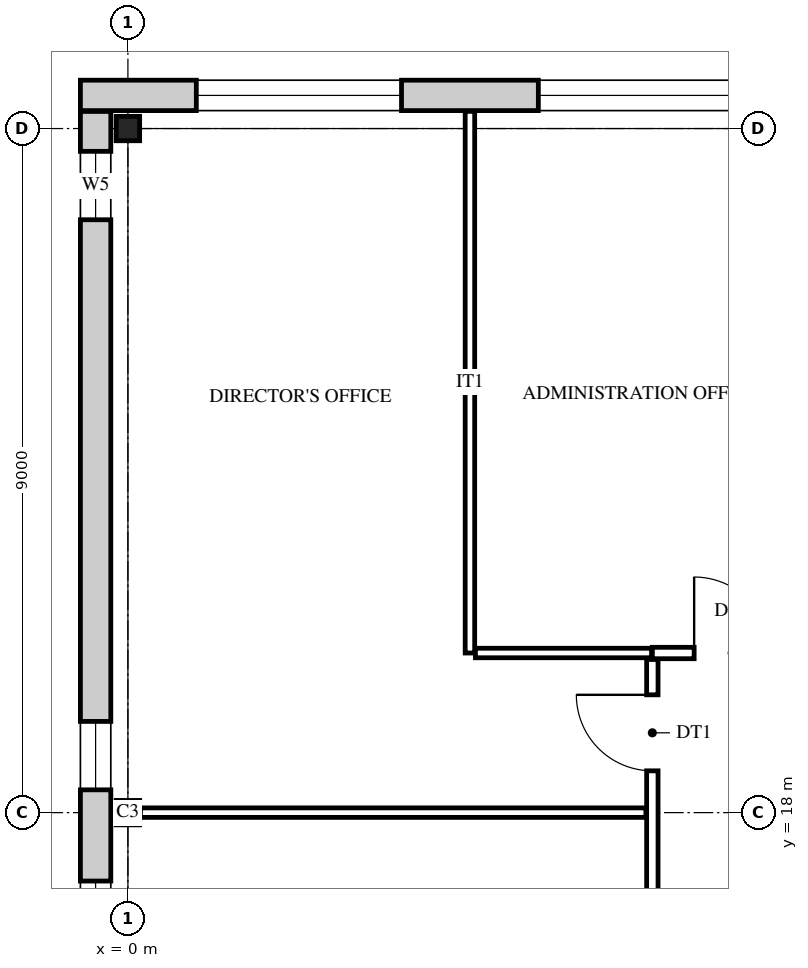
"""IFC4 building model, lengths in metres.
Left out: names, types, materials, properties, quantities, classifications, styles, units other than length and angle.
Written with IfcOpenShell. Run it as: python <this file> out.ifc"""

import sys

from ifc_helpers import new_model, si_unit, direction, frame, frame_2d, origin, origin_2d, place, context, subcontext, project, spatial, rectangle, i_section, extrude, element, fill, save


model = new_model("IFC4")
c1 = context("Model", 3, precision=1e-05, world=origin(), true_north=direction((0.0, 1.0)))
c2 = subcontext(c1, "Body", "Model", "MODEL_VIEW")
j1 = project(units=[si_unit("LENGTHUNIT", "METRE"), si_unit("PLANEANGLEUNIT", "RADIAN")], contexts=[c1])
p1 = place(None, origin())
s1 = spatial("IfcSite", under=j1, at=p1, CompositionType="ELEMENT")
p2 = place(p1, origin())
s2 = spatial("IfcBuilding", under=s1, at=p2, CompositionType="ELEMENT")
p3 = place(p2, frame((0.0, 0.0, 57.0)))
s3 = spatial("IfcBuildingStorey", under=s2, at=p3, CompositionType="ELEMENT", Elevation=57.0)
for number, where, z_axis, x_axis in (
    (1, (0.0, 18.0, 0.0), (0.0, 0.0, 1.0), (1.0, 0.0, 0.0)),
    (2, (0.0, 27.0, 0.0), (0.0, 0.0, 1.0), (1.0, 0.0, 0.0)),
):
    element("IfcColumn", number, at=place(p3, frame(where, z_axis=z_axis, x_axis=x_axis)), inside=s3, PredefinedType="COLUMN", context=c2, shape_type="SweptSolid", body=[
        extrude(i_section(OverallWidth=0.309, OverallDepth=0.321, WebThickness=0.014, FlangeThickness=0.022, FilletRadius=0.017, at=origin_2d()), origin(), (0.0, 0.0, 1.0), 4.2),
    ])
p4 = place(p3, frame((-0.425, -0.225, 0.0), z_axis=(0.0, 0.0, 1.0), x_axis=(0.0, 1.0, 0.0)))
e3 = element("IfcWall", 3, at=p4, inside=s3, PredefinedType="STANDARD", context=c2, shape_type="SweptSolid", body=[
    extrude(rectangle(XDim=27.45, YDim=0.4, at=frame_2d((13.725, 0.0))), origin(), (0.0, 0.0, 1.0), 4.2),
])
p5 = place(p4, frame((0.525, 0.0, 0.9)))
e4 = element("IfcOpeningElement", 4, at=p5, cuts=e3, PredefinedType="OPENING", context=c2, shape_type="SweptSolid", body=[
    extrude(rectangle(XDim=0.9, YDim=2.0, at=frame_2d((0.45, 1.0))), frame((0.0, 0.21, 0.0), z_axis=(0.0, -1.0, 0.0), x_axis=(1.0, 0.0, 0.0)), (0.0, 0.0, 1.0), 0.42),
])
p6 = place(p4, frame((8.025, 0.0, 0.9)))
e5 = element("IfcOpeningElement", 5, at=p6, cuts=e3, PredefinedType="OPENING", context=c2, shape_type="SweptSolid", body=[
    extrude(rectangle(XDim=0.9, YDim=2.0, at=frame_2d((0.45, 1.0))), frame((0.0, 0.21, 0.0), z_axis=(0.0, -1.0, 0.0), x_axis=(1.0, 0.0, 0.0)), (0.0, 0.0, 1.0), 0.42),
])
p7 = place(p4, frame((10.125, 0.0, 0.9)))
e6 = element("IfcOpeningElement", 6, at=p7, cuts=e3, PredefinedType="OPENING", context=c2, shape_type="SweptSolid", body=[
    extrude(rectangle(XDim=2.7, YDim=2.5, at=frame_2d((1.35, 1.25))), frame((0.0, 0.21, 0.0), z_axis=(0.0, -1.0, 0.0), x_axis=(1.0, 0.0, 0.0)), (0.0, 0.0, 1.0), 0.42),
])
p8 = place(p4, frame((14.625, 0.0, 0.9)))
e7 = element("IfcOpeningElement", 7, at=p8, cuts=e3, PredefinedType="OPENING", context=c2, shape_type="SweptSolid", body=[
    extrude(rectangle(XDim=2.7, YDim=2.5, at=frame_2d((1.35, 1.25))), frame((0.0, 0.21, 0.0), z_axis=(0.0, -1.0, 0.0), x_axis=(1.0, 0.0, 0.0)), (0.0, 0.0, 1.0), 0.42),
])
p9 = place(p4, frame((18.525, 0.0, 0.9)))
e8 = element("IfcOpeningElement", 8, at=p9, cuts=e3, PredefinedType="OPENING", context=c2, shape_type="SweptSolid", body=[
    extrude(rectangle(XDim=0.9, YDim=2.0, at=frame_2d((0.45, 1.0))), frame((0.0, 0.21, 0.0), z_axis=(0.0, -1.0, 0.0), x_axis=(1.0, 0.0, 0.0)), (0.0, 0.0, 1.0), 0.42),
])
p10 = place(p4, frame((26.025, 0.0, 0.9)))
e9 = element("IfcOpeningElement", 9, at=p10, cuts=e3, PredefinedType="OPENING", context=c2, shape_type="SweptSolid", body=[
    extrude(rectangle(XDim=0.9, YDim=2.0, at=frame_2d((0.45, 1.0))), frame((0.0, 0.21, 0.0), z_axis=(0.0, -1.0, 0.0), x_axis=(1.0, 0.0, 0.0)), (0.0, 0.0, 1.0), 0.42),
])
p11 = place(p3, frame((-0.625, 27.436, 0.0), z_axis=(0.0, 0.0, 1.0), x_axis=(1.0, 0.0, 0.0)))
e10 = element("IfcWall", 10, at=p11, inside=s3, PredefinedType="STANDARD", context=c2, shape_type="SweptSolid", body=[
    extrude(rectangle(XDim=32.75, YDim=0.4, at=frame_2d((16.375, 0.0))), origin(), (0.0, 0.0, 1.0), 4.2),
])
p12 = place(p11, frame((1.525, 0.0, 0.9)))
e11 = element("IfcOpeningElement", 11, at=p12, cuts=e10, PredefinedType="OPENING", context=c2, shape_type="SweptSolid", body=[
    extrude(rectangle(XDim=2.7, YDim=2.5, at=frame_2d((1.35, 1.25))), frame((0.0, 0.21, 0.0), z_axis=(0.0, -1.0, 0.0), x_axis=(1.0, 0.0, 0.0)), (0.0, 0.0, 1.0), 0.42),
])
p13 = place(p11, frame((6.025, 0.0, 0.9)))
e12 = element("IfcOpeningElement", 12, at=p13, cuts=e10, PredefinedType="OPENING", context=c2, shape_type="SweptSolid", body=[
    extrude(rectangle(XDim=2.7, YDim=2.5, at=frame_2d((1.35, 1.25))), frame((0.0, 0.21, 0.0), z_axis=(0.0, -1.0, 0.0), x_axis=(1.0, 0.0, 0.0)), (0.0, 0.0, 1.0), 0.42),
])
p14 = place(p11, frame((10.525, 0.0, 0.9)))
e13 = element("IfcOpeningElement", 13, at=p14, cuts=e10, PredefinedType="OPENING", context=c2, shape_type="SweptSolid", body=[
    extrude(rectangle(XDim=2.7, YDim=2.5, at=frame_2d((1.35, 1.25))), frame((0.0, 0.21, 0.0), z_axis=(0.0, -1.0, 0.0), x_axis=(1.0, 0.0, 0.0)), (0.0, 0.0, 1.0), 0.42),
])
p15 = place(p11, frame((15.025, 0.0, 0.9)))
e14 = element("IfcOpeningElement", 14, at=p15, cuts=e10, PredefinedType="OPENING", context=c2, shape_type="SweptSolid", body=[
    extrude(rectangle(XDim=2.7, YDim=2.5, at=frame_2d((1.35, 1.25))), frame((0.0, 0.21, 0.0), z_axis=(0.0, -1.0, 0.0), x_axis=(1.0, 0.0, 0.0)), (0.0, 0.0, 1.0), 0.42),
])
p16 = place(p11, frame((19.525, 0.0, 0.9)))
e15 = element("IfcOpeningElement", 15, at=p16, cuts=e10, PredefinedType="OPENING", context=c2, shape_type="SweptSolid", body=[
    extrude(rectangle(XDim=2.7, YDim=2.5, at=frame_2d((1.35, 1.25))), frame((0.0, 0.21, 0.0), z_axis=(0.0, -1.0, 0.0), x_axis=(1.0, 0.0, 0.0)), (0.0, 0.0, 1.0), 0.42),
])
p17 = place(p11, frame((24.025, 0.0, 0.9)))
e16 = element("IfcOpeningElement", 16, at=p17, cuts=e10, PredefinedType="OPENING", context=c2, shape_type="SweptSolid", body=[
    extrude(rectangle(XDim=2.7, YDim=2.5, at=frame_2d((1.35, 1.25))), frame((0.0, 0.21, 0.0), z_axis=(0.0, -1.0, 0.0), x_axis=(1.0, 0.0, 0.0)), (0.0, 0.0, 1.0), 0.42),
])
p18 = place(p11, frame((28.525, 0.0, 0.9)))
e17 = element("IfcOpeningElement", 17, at=p18, cuts=e10, PredefinedType="OPENING", context=c2, shape_type="SweptSolid", body=[
    extrude(rectangle(XDim=2.7, YDim=2.5, at=frame_2d((1.35, 1.25))), frame((0.0, 0.21, 0.0), z_axis=(0.0, -1.0, 0.0), x_axis=(1.0, 0.0, 0.0)), (0.0, 0.0, 1.0), 0.42),
])
p19 = place(p3, frame((4.5, 20.1, 0.0), z_axis=(0.0, 0.0, 1.0), x_axis=(0.0, 1.0, 0.0)))
e18 = element("IfcWall", 18, at=p19, inside=s3, PredefinedType="PARTITIONING", context=c2, shape_type="SweptSolid", body=[
    extrude(rectangle(XDim=7.126, YDim=0.125, at=frame_2d((3.563, 0.0))), origin(), (0.0, 0.0, 1.0), 3.542),
])
p20 = place(p3, frame((6.9, 6.985, 0.0), z_axis=(0.0, 0.0, 1.0), x_axis=(0.0, 1.0, 0.0)))
e19 = element("IfcWall", 19, at=p20, inside=s3, PredefinedType="PARTITIONING", context=c2, shape_type="SweptSolid", body=[
    extrude(rectangle(XDim=13.03, YDim=0.15, at=frame_2d((6.515, 0.0))), origin(), (0.0, 0.0, 1.0), 3.542),
])
p21 = place(p20, frame((11.565, 0.0, 0.0)))
e20 = element("IfcOpeningElement", 20, at=p21, cuts=e19, PredefinedType="OPENING", context=c2, shape_type="SweptSolid", body=[
    extrude(rectangle(XDim=1.0, YDim=2.1, at=frame_2d((0.5, 1.05))), frame((0.0, 0.085, 0.0), z_axis=(0.0, -1.0, 0.0), x_axis=(1.0, 0.0, 0.0)), (0.0, 0.0, 1.0), 0.17),
])
p22 = place(p20, frame((3.765, 0.0, 0.0)))
e21 = element("IfcOpeningElement", 21, at=p22, cuts=e19, PredefinedType="OPENING", context=c2, shape_type="SweptSolid", body=[
    extrude(rectangle(XDim=1.0, YDim=2.1, at=frame_2d((0.5, 1.05))), frame((0.0, 0.085, 0.0), z_axis=(0.0, -1.0, 0.0), x_axis=(1.0, 0.0, 0.0)), (0.0, 0.0, 1.0), 0.17),
])
p23 = place(p20, frame((8.265, 0.0, 0.0)))
e22 = element("IfcOpeningElement", 22, at=p23, cuts=e19, PredefinedType="OPENING", context=c2, shape_type="SweptSolid", body=[
    extrude(rectangle(XDim=1.0, YDim=2.1, at=frame_2d((0.5, 1.05))), frame((0.0, 0.085, 0.0), z_axis=(0.0, -1.0, 0.0), x_axis=(1.0, 0.0, 0.0)), (0.0, 0.0, 1.0), 0.17),
])
p24 = place(p3, frame((0.165, 18.0, 0.0), z_axis=(0.0, 0.0, 1.0), x_axis=(1.0, 0.0, 0.0)))
e23 = element("IfcWall", 23, at=p24, inside=s3, PredefinedType="PARTITIONING", context=c2, shape_type="SweptSolid", body=[
    extrude(rectangle(XDim=6.65, YDim=0.125, at=frame_2d((3.325, 0.0))), origin(), (0.0, 0.0, 1.0), 3.542),
])
p25 = place(p3, frame((4.573, 20.1, 0.0), z_axis=(0.0, 0.0, 1.0), x_axis=(1.0, 0.0, 0.0)))
e24 = element("IfcWall", 24, at=p25, inside=s3, PredefinedType="PARTITIONING", context=c2, shape_type="SweptSolid", body=[
    extrude(rectangle(XDim=2.317, YDim=0.125, at=frame_2d((1.159, 0.0))), origin(), (0.0, 0.0, 1.0), 3.542),
])
p26 = place(p3, frame((6.9, 20.1, 0.0), z_axis=(0.0, 0.0, 1.0), x_axis=(1.0, 0.0, 0.0)))
e25 = element("IfcWall", 25, at=p26, inside=s3, PredefinedType="PARTITIONING", context=c2, shape_type="SweptSolid", body=[
    extrude(rectangle(XDim=20.1, YDim=0.15, at=frame_2d((10.05, 0.0))), origin(), (0.0, 0.0, 1.0), 3.542),
])
p27 = place(p26, frame((0.55, 0.0, 0.0)))
e26 = element("IfcOpeningElement", 26, at=p27, cuts=e25, PredefinedType="OPENING", context=c2, shape_type="SweptSolid", body=[
    extrude(rectangle(XDim=1.0, YDim=2.1, at=frame_2d((0.5, 1.05))), frame((0.0, 0.085, 0.0), z_axis=(0.0, -1.0, 0.0), x_axis=(1.0, 0.0, 0.0)), (0.0, 0.0, 1.0), 0.17),
])
p28 = place(p26, frame((3.85, 0.0, 0.0)))
e27 = element("IfcOpeningElement", 27, at=p28, cuts=e25, PredefinedType="OPENING", context=c2, shape_type="SweptSolid", body=[
    extrude(rectangle(XDim=1.0, YDim=2.1, at=frame_2d((0.5, 1.05))), frame((0.0, 0.085, 0.0), z_axis=(0.0, -1.0, 0.0), x_axis=(1.0, 0.0, 0.0)), (0.0, 0.0, 1.0), 0.17),
])
p29 = place(p26, frame((8.35, 0.0, 0.0)))
e28 = element("IfcOpeningElement", 28, at=p29, cuts=e25, PredefinedType="OPENING", context=c2, shape_type="SweptSolid", body=[
    extrude(rectangle(XDim=1.0, YDim=2.1, at=frame_2d((0.5, 1.05))), frame((0.0, 0.085, 0.0), z_axis=(0.0, -1.0, 0.0), x_axis=(1.0, 0.0, 0.0)), (0.0, 0.0, 1.0), 0.17),
])
p30 = place(p26, frame((12.85, 0.0, 0.0)))
e29 = element("IfcOpeningElement", 29, at=p30, cuts=e25, PredefinedType="OPENING", context=c2, shape_type="SweptSolid", body=[
    extrude(rectangle(XDim=1.0, YDim=2.1, at=frame_2d((0.5, 1.05))), frame((0.0, 0.085, 0.0), z_axis=(0.0, -1.0, 0.0), x_axis=(1.0, 0.0, 0.0)), (0.0, 0.0, 1.0), 0.17),
])
p31 = place(p26, frame((18.55, 0.0, 0.0)))
e30 = element("IfcOpeningElement", 30, at=p31, cuts=e25, PredefinedType="OPENING", context=c2, shape_type="SweptSolid", body=[
    extrude(rectangle(XDim=1.0, YDim=2.1, at=frame_2d((0.5, 1.05))), frame((0.0, 0.085, 0.0), z_axis=(0.0, -1.0, 0.0), x_axis=(1.0, 0.0, 0.0)), (0.0, 0.0, 1.0), 0.17),
])
p32 = place(p8, origin())
e31 = element("IfcWindow", 31, at=p32, inside=s3, PartitioningType="SINGLE_PANEL", PredefinedType="WINDOW", context=c2, shape_type="SweptSolid", body=[
    extrude(rectangle(XDim=2.7, YDim=2.5, at=frame_2d((1.35, 1.25))), frame((0.0, 0.03, 0.0), z_axis=(0.0, -1.0, 0.0), x_axis=(1.0, 0.0, 0.0)), (0.0, 0.0, 1.0), 0.06),
])
fill(e7, e31)
p33 = place(p9, origin())
e32 = element("IfcWindow", 32, at=p33, inside=s3, PartitioningType="SINGLE_PANEL", PredefinedType="WINDOW", context=c2, shape_type="SweptSolid", body=[
    extrude(rectangle(XDim=0.9, YDim=2.0, at=frame_2d((0.45, 1.0))), frame((0.0, 0.03, 0.0), z_axis=(0.0, -1.0, 0.0), x_axis=(1.0, 0.0, 0.0)), (0.0, 0.0, 1.0), 0.06),
])
fill(e8, e32)
p34 = place(p10, origin())
e33 = element("IfcWindow", 33, at=p34, inside=s3, PartitioningType="SINGLE_PANEL", PredefinedType="WINDOW", context=c2, shape_type="SweptSolid", body=[
    extrude(rectangle(XDim=0.9, YDim=2.0, at=frame_2d((0.45, 1.0))), frame((0.0, 0.03, 0.0), z_axis=(0.0, -1.0, 0.0), x_axis=(1.0, 0.0, 0.0)), (0.0, 0.0, 1.0), 0.06),
])
fill(e9, e33)
p35 = place(p12, origin())
e34 = element("IfcWindow", 34, at=p35, inside=s3, PartitioningType="SINGLE_PANEL", PredefinedType="WINDOW", context=c2, shape_type="SweptSolid", body=[
    extrude(rectangle(XDim=2.7, YDim=2.5, at=frame_2d((1.35, 1.25))), frame((0.0, 0.03, 0.0), z_axis=(0.0, -1.0, 0.0), x_axis=(1.0, 0.0, 0.0)), (0.0, 0.0, 1.0), 0.06),
])
fill(e11, e34)
p36 = place(p13, origin())
e35 = element("IfcWindow", 35, at=p36, inside=s3, PartitioningType="SINGLE_PANEL", PredefinedType="WINDOW", context=c2, shape_type="SweptSolid", body=[
    extrude(rectangle(XDim=2.7, YDim=2.5, at=frame_2d((1.35, 1.25))), frame((0.0, 0.03, 0.0), z_axis=(0.0, -1.0, 0.0), x_axis=(1.0, 0.0, 0.0)), (0.0, 0.0, 1.0), 0.06),
])
fill(e12, e35)
p37 = place(p21, origin())
e36 = element("IfcDoor", 36, at=p37, inside=s3, OperationType="SINGLE_SWING_RIGHT", PredefinedType="DOOR", context=c2, shape_type="SweptSolid", body=[
    extrude(rectangle(XDim=1.0, YDim=2.1, at=frame_2d((0.5, 1.05))), frame((0.0, 0.025, 0.0), z_axis=(0.0, -1.0, 0.0), x_axis=(1.0, 0.0, 0.0)), (0.0, 0.0, 1.0), 0.05),
])
fill(e20, e36)
p38 = place(p27, origin())
e37 = element("IfcDoor", 37, at=p38, inside=s3, OperationType="SINGLE_SWING_LEFT", PredefinedType="DOOR", context=c2, shape_type="SweptSolid", body=[
    extrude(rectangle(XDim=1.0, YDim=2.1, at=frame_2d((0.5, 1.05))), frame((0.0, 0.025, 0.0), z_axis=(0.0, -1.0, 0.0), x_axis=(1.0, 0.0, 0.0)), (0.0, 0.0, 1.0), 0.05),
])
fill(e26, e37)
save(model, sys.argv[1])
